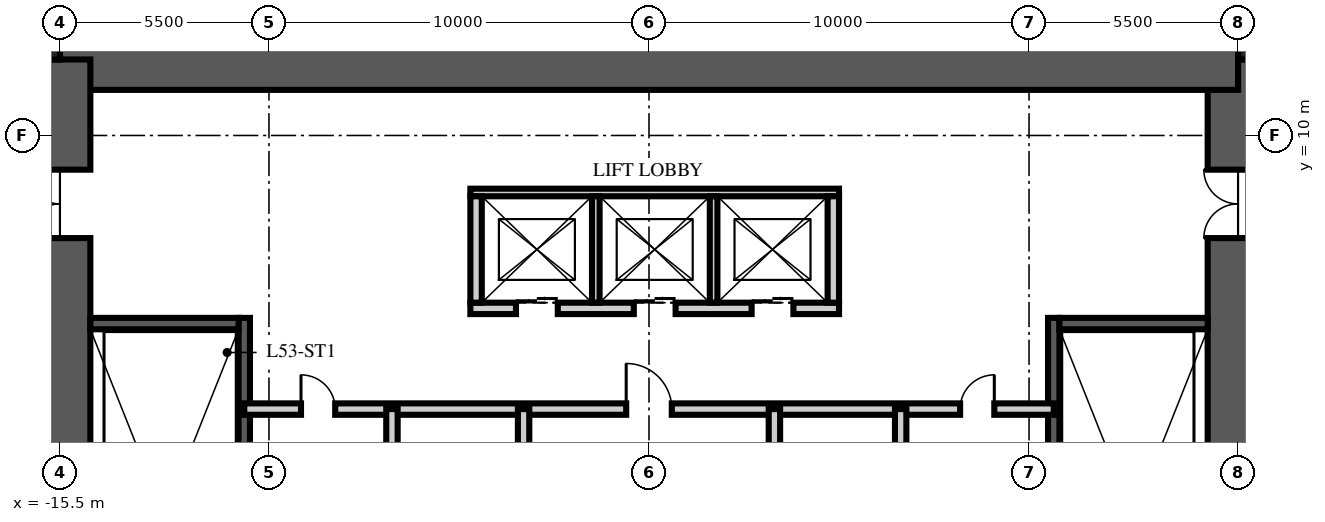
"""IFC4 building model, lengths in metres.
Left out: names, types, materials, properties, quantities, classifications, styles, units other than length and angle.
Written with IfcOpenShell. Run it as: python <this file> out.ifc"""

import sys

from ifc_helpers import new_model, si_unit, direction, frame, frame_2d, origin, origin_2d, place, context, subcontext, project, spatial, rectangle, extrude, element, fill, save


model = new_model("IFC4")
c1 = context("Model", 3, precision=1e-05, world=origin(), true_north=direction((0.0, 1.0)))
c2 = subcontext(c1, "Body", "Model", "MODEL_VIEW")
j1 = project(units=[si_unit("LENGTHUNIT", "METRE"), si_unit("PLANEANGLEUNIT", "RADIAN")], contexts=[c1])
p1 = place(None, origin())
s1 = spatial("IfcSite", under=j1, at=p1, CompositionType="ELEMENT")
p2 = place(p1, origin())
s2 = spatial("IfcBuilding", under=s1, at=p2, CompositionType="ELEMENT")
p3 = place(p2, frame((0.0, 0.0, 214.5)))
s3 = spatial("IfcBuildingStorey", under=s2, at=p3, CompositionType="ELEMENT", Elevation=214.5)
p4 = place(p3, frame((15.5, -12.0, -0.25), z_axis=(0.0, 0.0, 1.0), x_axis=(0.0, 1.0, 0.0)))
e1 = element("IfcWall", 1, at=p4, inside=s3, PredefinedType="SHEAR", context=c2, shape_type="SweptSolid", body=[
    extrude(rectangle(XDim=24.0, YDim=1.6, at=frame_2d((12.0, 0.0))), origin(), (0.0, 0.0, 1.0), 3.75),
])
p5 = place(p4, frame((3.2, 0.0, 0.25)))
e2 = element("IfcOpeningElement", 2, at=p5, cuts=e1, PredefinedType="OPENING", context=c2, shape_type="SweptSolid", body=[
    extrude(rectangle(XDim=1.2, YDim=2.1, at=frame_2d((0.6, 1.05))), frame((0.0, 0.81, 0.0), z_axis=(0.0, -1.0, 0.0), x_axis=(1.0, 0.0, 0.0)), (0.0, 0.0, 1.0), 1.62),
])
p6 = place(p4, frame((19.3, 0.0, 0.25)))
e3 = element("IfcOpeningElement", 3, at=p6, cuts=e1, PredefinedType="OPENING", context=c2, shape_type="SweptSolid", body=[
    extrude(rectangle(XDim=1.8, YDim=2.1, at=frame_2d((0.9, 1.05))), frame((0.0, 0.81, 0.0), z_axis=(0.0, -1.0, 0.0), x_axis=(1.0, 0.0, 0.0)), (0.0, 0.0, 1.0), 1.62),
])
p7 = place(p3, frame((-15.5, 12.0, -0.25), z_axis=(0.0, 0.0, 1.0), x_axis=(1.0, 0.0, 0.0)))
e4 = element("IfcWall", 4, at=p7, inside=s3, PredefinedType="SHEAR", context=c2, shape_type="SweptSolid", body=[
    extrude(rectangle(XDim=31.0, YDim=1.6, at=frame_2d((15.5, 0.0))), origin(), (0.0, 0.0, 1.0), 3.75),
])
p8 = place(p3, frame((-15.5, -12.0, -0.25), z_axis=(0.0, 0.0, 1.0), x_axis=(0.0, 1.0, 0.0)))
e5 = element("IfcWall", 5, at=p8, inside=s3, PredefinedType="SHEAR", context=c2, shape_type="SweptSolid", body=[
    extrude(rectangle(XDim=24.0, YDim=1.6, at=frame_2d((12.0, 0.0))), origin(), (0.0, 0.0, 1.0), 3.75),
])
p9 = place(p8, frame((3.2, 0.0, 0.25)))
e6 = element("IfcOpeningElement", 6, at=p9, cuts=e5, PredefinedType="OPENING", context=c2, shape_type="SweptSolid", body=[
    extrude(rectangle(XDim=1.2, YDim=2.1, at=frame_2d((0.6, 1.05))), frame((0.0, 0.81, 0.0), z_axis=(0.0, -1.0, 0.0), x_axis=(1.0, 0.0, 0.0)), (0.0, 0.0, 1.0), 1.62),
])
p10 = place(p8, frame((19.3, 0.0, 0.25)))
e7 = element("IfcOpeningElement", 7, at=p10, cuts=e5, PredefinedType="OPENING", context=c2, shape_type="SweptSolid", body=[
    extrude(rectangle(XDim=1.8, YDim=2.1, at=frame_2d((0.9, 1.05))), frame((0.0, 0.81, 0.0), z_axis=(0.0, -1.0, 0.0), x_axis=(1.0, 0.0, 0.0)), (0.0, 0.0, 1.0), 1.62),
])
for number, where, z_axis, x_axis in (
    (8, (15.9, 12.4, -0.25), (0.0, 0.0, 1.0), (1.0, 0.0, 0.0)),
    (9, (-15.9, 12.4, -0.25), (0.0, 0.0, 1.0), (1.0, 0.0, 0.0)),
):
    element("IfcColumn", number, at=place(p3, frame(where, z_axis=z_axis, x_axis=x_axis)), inside=s3, PredefinedType="COLUMN", context=c2, shape_type="SweptSolid", body=[
        extrude(rectangle(XDim=0.8, YDim=0.8, at=origin_2d()), origin(), (0.0, 0.0, 1.0), 3.75),
    ])
p11 = place(p3, frame((-10.65, -4.9, 0.0), z_axis=(0.0, 0.0, 1.0), x_axis=(0.0, 1.0, 0.0)))
e10 = element("IfcWall", 10, at=p11, inside=s3, PredefinedType="SOLIDWALL", context=c2, shape_type="SweptSolid", body=[
    extrude(rectangle(XDim=10.1, YDim=0.3, at=frame_2d((5.05, 0.0))), origin(), (0.0, 0.0, 1.0), 3.5),
])
p12 = place(p3, frame((-14.7, 5.05, 0.0), z_axis=(0.0, 0.0, 1.0), x_axis=(1.0, 0.0, 0.0)))
e11 = element("IfcWall", 11, at=p12, inside=s3, PredefinedType="SOLIDWALL", context=c2, shape_type="SweptSolid", body=[
    extrude(rectangle(XDim=3.9, YDim=0.3, at=frame_2d((1.95, 0.0))), origin(), (0.0, 0.0, 1.0), 3.5),
])
p13 = place(p3, frame((10.65, -4.9, 0.0), z_axis=(0.0, 0.0, 1.0), x_axis=(0.0, 1.0, 0.0)))
e12 = element("IfcWall", 12, at=p13, inside=s3, PredefinedType="SOLIDWALL", context=c2, shape_type="SweptSolid", body=[
    extrude(rectangle(XDim=10.1, YDim=0.3, at=frame_2d((5.05, 0.0))), origin(), (0.0, 0.0, 1.0), 3.5),
])
p14 = place(p3, frame((14.7, 5.05, 0.0), z_axis=(0.0, 0.0, 1.0), x_axis=(-1.0, 0.0, 0.0)))
e13 = element("IfcWall", 13, at=p14, inside=s3, PredefinedType="SOLIDWALL", context=c2, shape_type="SweptSolid", body=[
    extrude(rectangle(XDim=3.9, YDim=0.3, at=frame_2d((1.95, 0.0))), origin(), (0.0, 0.0, 1.0), 3.5),
])
p15 = place(p3, frame((-4.7, 5.45, 0.0), z_axis=(0.0, 0.0, 1.0), x_axis=(1.0, 0.0, 0.0)))
e14 = element("IfcWall", 14, at=p15, inside=s3, PredefinedType="PARTITIONING", context=c2, shape_type="SweptSolid", body=[
    extrude(rectangle(XDim=9.7, YDim=0.3, at=frame_2d((4.85, 0.0))), origin(), (0.0, 0.0, 1.0), 3.5),
])
p16 = place(p15, frame((1.2, 0.0, 0.0)))
e15 = element("IfcOpeningElement", 15, at=p16, cuts=e14, PredefinedType="OPENING", context=c2, shape_type="SweptSolid", body=[
    extrude(rectangle(XDim=1.1, YDim=2.1, at=frame_2d((0.55, 1.05))), frame((0.0, 0.16, 0.0), z_axis=(0.0, -1.0, 0.0), x_axis=(1.0, 0.0, 0.0)), (0.0, 0.0, 1.0), 0.32),
])
p17 = place(p15, frame((4.3, 0.0, 0.0)))
e16 = element("IfcOpeningElement", 16, at=p17, cuts=e14, PredefinedType="OPENING", context=c2, shape_type="SweptSolid", body=[
    extrude(rectangle(XDim=1.1, YDim=2.1, at=frame_2d((0.55, 1.05))), frame((0.0, 0.16, 0.0), z_axis=(0.0, -1.0, 0.0), x_axis=(1.0, 0.0, 0.0)), (0.0, 0.0, 1.0), 0.32),
])
p18 = place(p15, frame((7.4, 0.0, 0.0)))
e17 = element("IfcOpeningElement", 17, at=p18, cuts=e14, PredefinedType="OPENING", context=c2, shape_type="SweptSolid", body=[
    extrude(rectangle(XDim=1.1, YDim=2.1, at=frame_2d((0.55, 1.05))), frame((0.0, 0.16, 0.0), z_axis=(0.0, -1.0, 0.0), x_axis=(1.0, 0.0, 0.0)), (0.0, 0.0, 1.0), 0.32),
])
p19 = place(p3, frame((-4.7, 8.5, 0.0), z_axis=(0.0, 0.0, 1.0), x_axis=(1.0, 0.0, 0.0)))
e18 = element("IfcWall", 18, at=p19, inside=s3, PredefinedType="PARTITIONING", context=c2, shape_type="SweptSolid", body=[
    extrude(rectangle(XDim=9.7, YDim=0.2, at=frame_2d((4.85, 0.0))), origin(), (0.0, 0.0, 1.0), 3.5),
])
for number, where, z_axis, x_axis in (
    (19, (-4.55, 5.6, 0.0), (0.0, 0.0, 1.0), (0.0, 1.0, 0.0)),
    (20, (4.85, 5.6, 0.0), (0.0, 0.0, 1.0), (0.0, 1.0, 0.0)),
):
    element("IfcWall", number, at=place(p3, frame(where, z_axis=z_axis, x_axis=x_axis)), inside=s3, PredefinedType="PARTITIONING", context=c2, shape_type="SweptSolid", body=[
        extrude(rectangle(XDim=2.8, YDim=0.3, at=frame_2d((1.4, 0.0))), origin(), (0.0, 0.0, 1.0), 3.5),
    ])
for number, where, z_axis, x_axis in (
    (21, (-1.4, 5.6, 0.0), (0.0, 0.0, 1.0), (0.0, 1.0, 0.0)),
    (22, (1.7, 5.6, 0.0), (0.0, 0.0, 1.0), (0.0, 1.0, 0.0)),
):
    element("IfcWall", number, at=place(p3, frame(where, z_axis=z_axis, x_axis=x_axis)), inside=s3, PredefinedType="PARTITIONING", context=c2, shape_type="SweptSolid", body=[
        extrude(rectangle(XDim=2.8, YDim=0.2, at=frame_2d((1.4, 0.0))), origin(), (0.0, 0.0, 1.0), 3.5),
    ])
p20 = place(p3, frame((-10.65, 2.8, 0.0), z_axis=(0.0, 0.0, 1.0), x_axis=(1.0, 0.0, 0.0)))
e23 = element("IfcWall", 23, at=p20, inside=s3, PredefinedType="PARTITIONING", context=c2, shape_type="SweptSolid", body=[
    extrude(rectangle(XDim=21.3, YDim=0.3, at=frame_2d((10.65, 0.0))), origin(), (0.0, 0.0, 1.0), 3.5),
])
p21 = place(p20, frame((10.05, 0.0, 0.0)))
e24 = element("IfcOpeningElement", 24, at=p21, cuts=e23, PredefinedType="OPENING", context=c2, shape_type="SweptSolid", body=[
    extrude(rectangle(XDim=1.2, YDim=2.1, at=frame_2d((0.6, 1.05))), frame((0.0, 0.16, 0.0), z_axis=(0.0, -1.0, 0.0), x_axis=(1.0, 0.0, 0.0)), (0.0, 0.0, 1.0), 0.32),
])
p22 = place(p20, frame((1.493, 0.0, 0.0)))
e25 = element("IfcOpeningElement", 25, at=p22, cuts=e23, PredefinedType="OPENING", context=c2, shape_type="SweptSolid", body=[
    extrude(rectangle(XDim=0.9, YDim=2.1, at=frame_2d((0.45, 1.05))), frame((0.0, 0.16, 0.0), z_axis=(0.0, -1.0, 0.0), x_axis=(1.0, 0.0, 0.0)), (0.0, 0.0, 1.0), 0.32),
])
p23 = place(p20, frame((18.836, 0.0, 0.0)))
e26 = element("IfcOpeningElement", 26, at=p23, cuts=e23, PredefinedType="OPENING", context=c2, shape_type="SweptSolid", body=[
    extrude(rectangle(XDim=0.9, YDim=2.1, at=frame_2d((0.45, 1.05))), frame((0.0, 0.16, 0.0), z_axis=(0.0, -1.0, 0.0), x_axis=(1.0, 0.0, 0.0)), (0.0, 0.0, 1.0), 0.32),
])
p24 = place(p3, frame((-3.3, -6.65, 0.0), z_axis=(0.0, 0.0, 1.0), x_axis=(0.0, 1.0, 0.0)))
e27 = element("IfcWall", 27, at=p24, inside=s3, PredefinedType="PARTITIONING", context=c2, shape_type="SweptSolid", body=[
    extrude(rectangle(XDim=9.45, YDim=0.3, at=frame_2d((4.725, 0.0))), origin(), (0.0, 0.0, 1.0), 3.5),
])
p25 = place(p24, frame((4.275, 0.0, 0.0)))
e28 = element("IfcOpeningElement", 28, at=p25, cuts=e27, PredefinedType="OPENING", context=c2, shape_type="SweptSolid", body=[
    extrude(rectangle(XDim=0.9, YDim=2.1, at=frame_2d((0.45, 1.05))), frame((0.0, 0.16, 0.0), z_axis=(0.0, -1.0, 0.0), x_axis=(1.0, 0.0, 0.0)), (0.0, 0.0, 1.0), 0.32),
])
p26 = place(p3, frame((3.3, -6.65, 0.0), z_axis=(0.0, 0.0, 1.0), x_axis=(0.0, 1.0, 0.0)))
e29 = element("IfcWall", 29, at=p26, inside=s3, PredefinedType="PARTITIONING", context=c2, shape_type="SweptSolid", body=[
    extrude(rectangle(XDim=9.45, YDim=0.3, at=frame_2d((4.725, 0.0))), origin(), (0.0, 0.0, 1.0), 3.5),
])
p27 = place(p26, frame((4.275, 0.0, 0.0)))
e30 = element("IfcOpeningElement", 30, at=p27, cuts=e29, PredefinedType="OPENING", context=c2, shape_type="SweptSolid", body=[
    extrude(rectangle(XDim=0.9, YDim=2.1, at=frame_2d((0.45, 1.05))), frame((0.0, 0.16, 0.0), z_axis=(0.0, -1.0, 0.0), x_axis=(1.0, 0.0, 0.0)), (0.0, 0.0, 1.0), 0.32),
])
for number, where, z_axis, x_axis in (
    (31, (-6.764, -6.65, 0.0), (0.0, 0.0, 1.0), (0.0, 1.0, 0.0)),
    (32, (6.622, -6.65, 0.0), (0.0, 0.0, 1.0), (0.0, 1.0, 0.0)),
):
    element("IfcWall", number, at=place(p3, frame(where, z_axis=z_axis, x_axis=x_axis)), inside=s3, PredefinedType="PARTITIONING", context=c2, shape_type="SweptSolid", body=[
        extrude(rectangle(XDim=9.45, YDim=0.3, at=frame_2d((4.725, 0.0))), origin(), (0.0, 0.0, 1.0), 3.5),
    ])
p28 = place(p10, origin())
e33 = element("IfcDoor", 33, at=p28, inside=s3, OperationType="DOUBLE_DOOR_SINGLE_SWING", PredefinedType="DOOR", context=c2, shape_type="SweptSolid", body=[
    extrude(rectangle(XDim=1.8, YDim=2.1, at=frame_2d((0.9, 1.05))), frame((0.0, 0.025, 0.0), z_axis=(0.0, -1.0, 0.0), x_axis=(1.0, 0.0, 0.0)), (0.0, 0.0, 1.0), 0.05),
])
fill(e7, e33)
p29 = place(p6, origin())
e34 = element("IfcDoor", 34, at=p29, inside=s3, OperationType="DOUBLE_DOOR_SINGLE_SWING", PredefinedType="DOOR", context=c2, shape_type="SweptSolid", body=[
    extrude(rectangle(XDim=1.8, YDim=2.1, at=frame_2d((0.9, 1.05))), frame((0.0, 0.025, 0.0), z_axis=(0.0, -1.0, 0.0), x_axis=(1.0, 0.0, 0.0)), (0.0, 0.0, 1.0), 0.05),
])
fill(e3, e34)
p30 = place(p16, origin())
e35 = element("IfcDoor", 35, at=p30, inside=s3, OperationType="DOUBLE_DOOR_SLIDING", PredefinedType="DOOR", context=c2, shape_type="SweptSolid", body=[
    extrude(rectangle(XDim=1.1, YDim=2.1, at=frame_2d((0.55, 1.05))), frame((0.0, 0.025, 0.0), z_axis=(0.0, -1.0, 0.0), x_axis=(1.0, 0.0, 0.0)), (0.0, 0.0, 1.0), 0.05),
])
fill(e15, e35)
p31 = place(p17, origin())
e36 = element("IfcDoor", 36, at=p31, inside=s3, OperationType="DOUBLE_DOOR_SLIDING", PredefinedType="DOOR", context=c2, shape_type="SweptSolid", body=[
    extrude(rectangle(XDim=1.1, YDim=2.1, at=frame_2d((0.55, 1.05))), frame((0.0, 0.025, 0.0), z_axis=(0.0, -1.0, 0.0), x_axis=(1.0, 0.0, 0.0)), (0.0, 0.0, 1.0), 0.05),
])
fill(e16, e36)
p32 = place(p18, origin())
e37 = element("IfcDoor", 37, at=p32, inside=s3, OperationType="DOUBLE_DOOR_SLIDING", PredefinedType="DOOR", context=c2, shape_type="SweptSolid", body=[
    extrude(rectangle(XDim=1.1, YDim=2.1, at=frame_2d((0.55, 1.05))), frame((0.0, 0.025, 0.0), z_axis=(0.0, -1.0, 0.0), x_axis=(1.0, 0.0, 0.0)), (0.0, 0.0, 1.0), 0.05),
])
fill(e17, e37)
p33 = place(p21, origin())
e38 = element("IfcDoor", 38, at=p33, inside=s3, OperationType="SINGLE_SWING_LEFT", PredefinedType="DOOR", context=c2, shape_type="SweptSolid", body=[
    extrude(rectangle(XDim=1.2, YDim=2.1, at=frame_2d((0.6, 1.05))), frame((0.0, 0.025, 0.0), z_axis=(0.0, -1.0, 0.0), x_axis=(1.0, 0.0, 0.0)), (0.0, 0.0, 1.0), 0.05),
])
fill(e24, e38)
p34 = place(p22, origin())
e39 = element("IfcDoor", 39, at=p34, inside=s3, OperationType="SINGLE_SWING_LEFT", PredefinedType="DOOR", context=c2, shape_type="SweptSolid", body=[
    extrude(rectangle(XDim=0.9, YDim=2.1, at=frame_2d((0.45, 1.05))), frame((0.0, 0.025, 0.0), z_axis=(0.0, -1.0, 0.0), x_axis=(1.0, 0.0, 0.0)), (0.0, 0.0, 1.0), 0.05),
])
fill(e25, e39)
p35 = place(p23, origin())
e40 = element("IfcDoor", 40, at=p35, inside=s3, OperationType="SINGLE_SWING_RIGHT", PredefinedType="DOOR", context=c2, shape_type="SweptSolid", body=[
    extrude(rectangle(XDim=0.9, YDim=2.1, at=frame_2d((0.45, 1.05))), frame((0.0, 0.025, 0.0), z_axis=(0.0, -1.0, 0.0), x_axis=(1.0, 0.0, 0.0)), (0.0, 0.0, 1.0), 0.05),
])
fill(e26, e40)
save(model, sys.argv[1])
